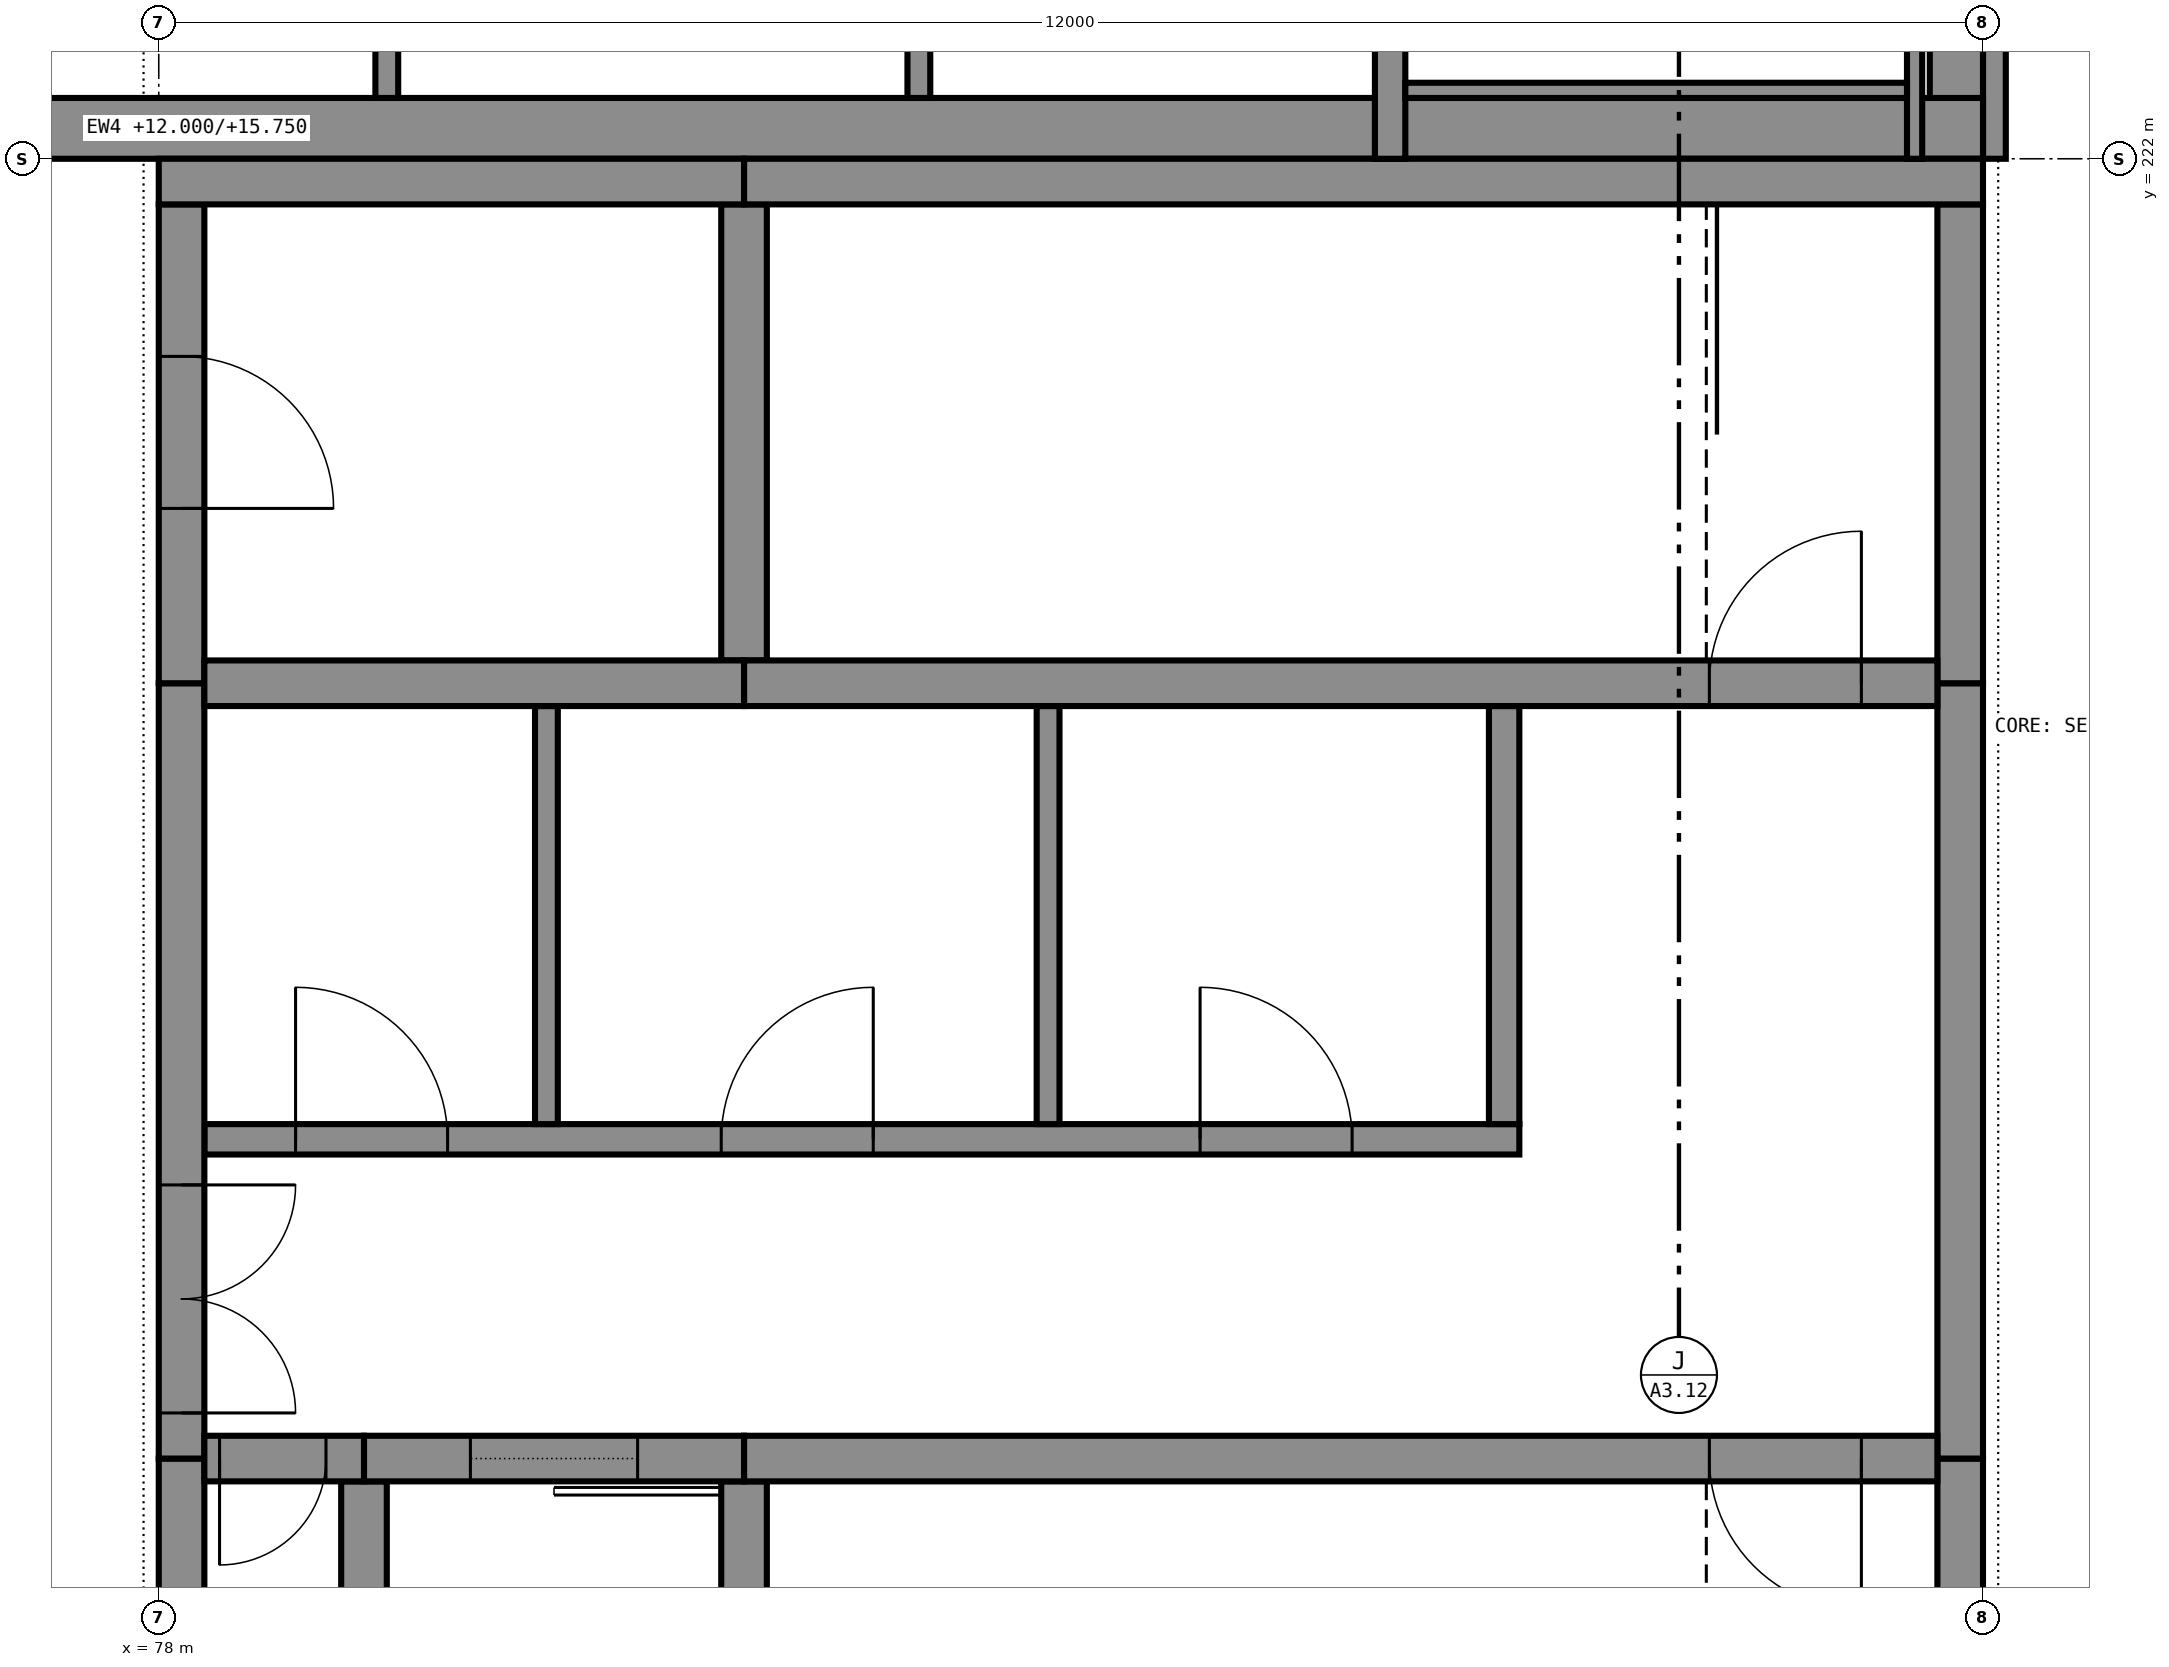
"""IFC4 building model, lengths in metres.
Left out: names, types, materials, properties, quantities, classifications, styles, units other than length and angle.
Written with IfcOpenShell. Run it as: python <this file> out.ifc"""

import sys

from ifc_helpers import new_model, si_unit, direction, frame, frame_2d, origin, place, context, subcontext, project, spatial, rectangle, extrude, element, fill, save


model = new_model("IFC4")
c1 = context("Model", 3, precision=1e-05, world=origin(), true_north=direction((0.0, 1.0)))
c2 = subcontext(c1, "Body", "Model", "MODEL_VIEW")
j1 = project(units=[si_unit("LENGTHUNIT", "METRE"), si_unit("PLANEANGLEUNIT", "RADIAN")], contexts=[c1])
p1 = place(None, origin())
s1 = spatial("IfcSite", under=j1, at=p1, CompositionType="ELEMENT")
p2 = place(p1, origin())
s2 = spatial("IfcBuilding", under=s1, at=p2, CompositionType="ELEMENT")
p3 = place(p2, frame((0.0, 0.0, 12.0)))
s3 = spatial("IfcBuildingStorey", under=s2, at=p3, CompositionType="ELEMENT", Elevation=12.0)
p4 = place(p3, frame((90.0, 221.85, 0.0), z_axis=(0.0, 0.0, 1.0), x_axis=(-1.0, 0.0, 0.0)))
e1 = element("IfcWall", 1, at=p4, inside=s3, PredefinedType="SHEAR", context=c2, shape_type="SweptSolid", body=[
    extrude(rectangle(XDim=8.15, YDim=0.3, at=frame_2d((4.075, 0.0))), origin(), (0.0, 0.0, 1.0), 5.0),
])
p5 = place(p3, frame((81.85, 221.85, 0.0), z_axis=(0.0, 0.0, 1.0), x_axis=(-1.0, 0.0, 0.0)))
e2 = element("IfcWall", 2, at=p5, inside=s3, PredefinedType="SHEAR", context=c2, shape_type="SweptSolid", body=[
    extrude(rectangle(XDim=3.85, YDim=0.3, at=frame_2d((1.925, 0.0))), origin(), (0.0, 0.0, 1.0), 5.0),
])
p6 = place(p3, frame((89.7, 213.45, 0.0), z_axis=(0.0, 0.0, 1.0), x_axis=(-1.0, 0.0, 0.0)))
e3 = element("IfcWall", 3, at=p6, inside=s3, PredefinedType="SHEAR", context=c2, shape_type="SweptSolid", body=[
    extrude(rectangle(XDim=7.85, YDim=0.3, at=frame_2d((3.925, 0.0))), origin(), (0.0, 0.0, 1.0), 5.0),
])
p7 = place(p6, frame((0.5, 0.0, 0.0)))
e4 = element("IfcOpeningElement", 4, at=p7, cuts=e3, PredefinedType="OPENING", context=c2, shape_type="SweptSolid", body=[
    extrude(rectangle(XDim=1.0, YDim=2.1, at=frame_2d((0.5, 1.05))), frame((0.0, 0.16, 0.0), z_axis=(0.0, -1.0, 0.0), x_axis=(1.0, 0.0, 0.0)), (0.0, 0.0, 1.0), 0.32),
])
p8 = place(p3, frame((81.85, 213.45, 0.0), z_axis=(0.0, 0.0, 1.0), x_axis=(-1.0, 0.0, 0.0)))
e5 = element("IfcWall", 5, at=p8, inside=s3, PredefinedType="SHEAR", context=c2, shape_type="SweptSolid", body=[
    extrude(rectangle(XDim=2.5, YDim=0.3, at=frame_2d((1.25, 0.0))), origin(), (0.0, 0.0, 1.0), 5.0),
])
p9 = place(p8, frame((0.7, 0.0, 0.0)))
e6 = element("IfcOpeningElement", 6, at=p9, cuts=e5, PredefinedType="OPENING", context=c2, shape_type="SweptSolid", body=[
    extrude(rectangle(XDim=1.1, YDim=2.1, at=frame_2d((0.55, 1.05))), frame((0.0, 0.16, 0.0), z_axis=(0.0, -1.0, 0.0), x_axis=(1.0, 0.0, 0.0)), (0.0, 0.0, 1.0), 0.32),
])
p10 = place(p3, frame((79.35, 213.45, 0.0), z_axis=(0.0, 0.0, 1.0), x_axis=(-1.0, 0.0, 0.0)))
e7 = element("IfcWall", 7, at=p10, inside=s3, PredefinedType="SHEAR", context=c2, shape_type="SweptSolid", body=[
    extrude(rectangle(XDim=1.05, YDim=0.3, at=frame_2d((0.525, 0.0))), origin(), (0.0, 0.0, 1.0), 5.0),
])
p11 = place(p10, frame((0.25, 0.0, 0.0)))
e8 = element("IfcOpeningElement", 8, at=p11, cuts=e7, PredefinedType="OPENING", context=c2, shape_type="SweptSolid", body=[
    extrude(rectangle(XDim=0.7, YDim=2.1, at=frame_2d((0.35, 1.05))), frame((0.0, 0.16, 0.0), z_axis=(0.0, -1.0, 0.0), x_axis=(1.0, 0.0, 0.0)), (0.0, 0.0, 1.0), 0.32),
])
p12 = place(p3, frame((89.7, 218.55, 0.0), z_axis=(0.0, 0.0, 1.0), x_axis=(-1.0, 0.0, 0.0)))
e9 = element("IfcWall", 9, at=p12, inside=s3, PredefinedType="SHEAR", context=c2, shape_type="SweptSolid", body=[
    extrude(rectangle(XDim=7.85, YDim=0.3, at=frame_2d((3.925, 0.0))), origin(), (0.0, 0.0, 1.0), 5.0),
])
p13 = place(p12, frame((0.5, 0.0, 0.0)))
e10 = element("IfcOpeningElement", 10, at=p13, cuts=e9, PredefinedType="OPENING", context=c2, shape_type="SweptSolid", body=[
    extrude(rectangle(XDim=1.0, YDim=2.1, at=frame_2d((0.5, 1.05))), frame((0.0, 0.16, 0.0), z_axis=(0.0, -1.0, 0.0), x_axis=(1.0, 0.0, 0.0)), (0.0, 0.0, 1.0), 0.32),
])
p14 = place(p3, frame((81.85, 218.55, 0.0), z_axis=(0.0, 0.0, 1.0), x_axis=(-1.0, 0.0, 0.0)))
e11 = element("IfcWall", 11, at=p14, inside=s3, PredefinedType="SHEAR", context=c2, shape_type="SweptSolid", body=[
    extrude(rectangle(XDim=3.55, YDim=0.3, at=frame_2d((1.775, 0.0))), origin(), (0.0, 0.0, 1.0), 5.0),
])
p15 = place(p3, frame((89.85, 210.0, 0.0), z_axis=(0.0, 0.0, 1.0), x_axis=(0.0, 1.0, 0.0)))
e12 = element("IfcWall", 12, at=p15, inside=s3, PredefinedType="SHEAR", context=c2, shape_type="SweptSolid", body=[
    extrude(rectangle(XDim=3.45, YDim=0.3, at=frame_2d((1.725, 0.0))), origin(), (0.0, 0.0, 1.0), 5.0),
])
p16 = place(p3, frame((89.85, 213.45, 0.0), z_axis=(0.0, 0.0, 1.0), x_axis=(0.0, 1.0, 0.0)))
e13 = element("IfcWall", 13, at=p16, inside=s3, PredefinedType="SHEAR", context=c2, shape_type="SweptSolid", body=[
    extrude(rectangle(XDim=5.1, YDim=0.3, at=frame_2d((2.55, 0.0))), origin(), (0.0, 0.0, 1.0), 5.0),
])
for number, where, z_axis, x_axis in (
    (14, (89.85, 218.55, 0.0), (0.0, 0.0, 1.0), (0.0, 1.0, 0.0)),
    (15, (78.15, 210.3, 0.0), (0.0, 0.0, 1.0), (0.0, 1.0, 0.0)),
):
    element("IfcWall", number, at=place(p3, frame(where, z_axis=z_axis, x_axis=x_axis)), inside=s3, PredefinedType="SHEAR", context=c2, shape_type="SweptSolid", body=[
        extrude(rectangle(XDim=3.15, YDim=0.3, at=frame_2d((1.575, 0.0))), origin(), (0.0, 0.0, 1.0), 5.0),
    ])
p17 = place(p3, frame((78.15, 213.45, 0.0), z_axis=(0.0, 0.0, 1.0), x_axis=(0.0, 1.0, 0.0)))
e16 = element("IfcWall", 16, at=p17, inside=s3, PredefinedType="SHEAR", context=c2, shape_type="SweptSolid", body=[
    extrude(rectangle(XDim=5.1, YDim=0.3, at=frame_2d((2.55, 0.0))), origin(), (0.0, 0.0, 1.0), 5.0),
])
p18 = place(p17, frame((0.3, 0.0, 0.0)))
e17 = element("IfcOpeningElement", 17, at=p18, cuts=e16, PredefinedType="OPENING", context=c2, shape_type="SweptSolid", body=[
    extrude(rectangle(XDim=1.5, YDim=2.1, at=frame_2d((0.75, 1.05))), frame((0.0, 0.16, 0.0), z_axis=(0.0, -1.0, 0.0), x_axis=(1.0, 0.0, 0.0)), (0.0, 0.0, 1.0), 0.32),
])
p19 = place(p3, frame((78.15, 218.55, 0.0), z_axis=(0.0, 0.0, 1.0), x_axis=(0.0, 1.0, 0.0)))
e18 = element("IfcWall", 18, at=p19, inside=s3, PredefinedType="SHEAR", context=c2, shape_type="SweptSolid", body=[
    extrude(rectangle(XDim=3.15, YDim=0.3, at=frame_2d((1.575, 0.0))), origin(), (0.0, 0.0, 1.0), 5.0),
])
p20 = place(p19, frame((1.15, 0.0, 0.0)))
e19 = element("IfcOpeningElement", 19, at=p20, cuts=e18, PredefinedType="OPENING", context=c2, shape_type="SweptSolid", body=[
    extrude(rectangle(XDim=1.0, YDim=2.1, at=frame_2d((0.5, 1.05))), frame((0.0, 0.16, 0.0), z_axis=(0.0, -1.0, 0.0), x_axis=(1.0, 0.0, 0.0)), (0.0, 0.0, 1.0), 0.32),
])
p21 = place(p3, frame((81.85, 210.0, 0.0), z_axis=(0.0, 0.0, 1.0), x_axis=(0.0, 1.0, 0.0)))
e20 = element("IfcWall", 20, at=p21, inside=s3, PredefinedType="SHEAR", context=c2, shape_type="SweptSolid", body=[
    extrude(rectangle(XDim=3.3, YDim=0.3, at=frame_2d((1.65, 0.0))), origin(), (0.0, 0.0, 1.0), 5.0),
])
for number, where, z_axis, x_axis in (
    (21, (81.85, 218.7, 0.0), (0.0, 0.0, 1.0), (0.0, 1.0, 0.0)),
    (22, (79.35, 210.3, 0.0), (0.0, 0.0, 1.0), (0.0, 1.0, 0.0)),
):
    element("IfcWall", number, at=place(p3, frame(where, z_axis=z_axis, x_axis=x_axis)), inside=s3, PredefinedType="SHEAR", context=c2, shape_type="SweptSolid", body=[
        extrude(rectangle(XDim=3.0, YDim=0.3, at=frame_2d((1.5, 0.0))), origin(), (0.0, 0.0, 1.0), 5.0),
    ])
p22 = place(p3, frame((86.1, 222.0, 0.0), z_axis=(0.0, 0.0, 1.0), x_axis=(0.0, 1.0, 0.0)))
e23 = element("IfcWall", 23, at=p22, inside=s3, PredefinedType="SHEAR", context=c2, shape_type="SweptSolid", body=[
    extrude(rectangle(XDim=7.5, YDim=0.2, at=frame_2d((3.75, 0.0))), origin(), (0.0, 0.0, 1.0), 5.0),
])
p23 = place(p3, frame((89.55, 229.7, 0.0), z_axis=(0.0, 0.0, 1.0), x_axis=(0.0, -1.0, 0.0)))
e24 = element("IfcWall", 24, at=p23, inside=s3, PredefinedType="SHEAR", context=c2, shape_type="SweptSolid", body=[
    extrude(rectangle(XDim=7.7, YDim=0.1, at=frame_2d((3.85, 0.0))), origin(), (0.0, 0.0, 1.0), 4.75),
])
p24 = place(p3, frame((89.5, 222.45, 0.0), z_axis=(0.0, 0.0, 1.0), x_axis=(-1.0, 0.0, 0.0)))
e25 = element("IfcWall", 25, at=p24, inside=s3, PredefinedType="SHEAR", context=c2, shape_type="SweptSolid", body=[
    extrude(rectangle(XDim=3.3, YDim=0.1, at=frame_2d((1.65, 0.0))), origin(), (0.0, 0.0, 1.0), 4.75),
])
p25 = place(p3, frame((66.5, 222.2, 0.0), z_axis=(0.0, 0.0, 1.0), x_axis=(1.0, 0.0, 0.0)))
e26 = element("IfcWall", 26, at=p25, inside=s3, PredefinedType="SOLIDWALL", context=c2, shape_type="SweptSolid", body=[
    extrude(rectangle(XDim=23.5, YDim=0.4, at=frame_2d((11.75, 0.0))), origin(), (0.0, 0.0, 1.0), 3.75),
])
p26 = place(p3, frame((89.825, 222.0, 0.0), z_axis=(0.0, 0.0, 1.0), x_axis=(0.0, 1.0, 0.0)))
e27 = element("IfcWall", 27, at=p26, inside=s3, PredefinedType="STANDARD", context=c2, shape_type="SweptSolid", body=[
    extrude(rectangle(XDim=11.5, YDim=0.35, at=frame_2d((5.75, 0.0))), origin(), (0.0, 0.0, 1.0), 3.75),
])
p27 = place(p26, frame((1.55, 0.0, 0.6)))
e28 = element("IfcOpeningElement", 28, at=p27, cuts=e27, PredefinedType="OPENING", context=c2, shape_type="SweptSolid", body=[
    extrude(rectangle(XDim=2.4, YDim=2.4, at=frame_2d((1.2, 1.2))), frame((0.0, 0.185, 0.0), z_axis=(0.0, -1.0, 0.0), x_axis=(1.0, 0.0, 0.0)), (0.0, 0.0, 1.0), 0.37),
])
p28 = place(p26, frame((7.8, 0.0, 0.6)))
e29 = element("IfcOpeningElement", 29, at=p28, cuts=e27, PredefinedType="OPENING", context=c2, shape_type="SweptSolid", body=[
    extrude(rectangle(XDim=2.4, YDim=2.4, at=frame_2d((1.2, 1.2))), frame((0.0, 0.185, 0.0), z_axis=(0.0, -1.0, 0.0), x_axis=(1.0, 0.0, 0.0)), (0.0, 0.0, 1.0), 0.37),
])
p29 = place(p3, frame((90.075, 222.0, 4.75), z_axis=(0.0, 0.0, 1.0), x_axis=(0.0, 1.0, 0.0)))
e30 = element("IfcWall", 30, at=p29, inside=s3, PredefinedType="STANDARD", context=c2, shape_type="SweptSolid", body=[
    extrude(rectangle(XDim=11.5, YDim=0.15, at=frame_2d((5.75, 0.0))), origin(), (0.0, 0.0, 1.0), 0.25),
])
p30 = place(p3, frame((78.3, 215.55, 0.0), z_axis=(0.0, 0.0, 1.0), x_axis=(1.0, 0.0, 0.0)))
e31 = element("IfcWall", 31, at=p30, inside=s3, PredefinedType="PARTITIONING", context=c2, shape_type="SweptSolid", body=[
    extrude(rectangle(XDim=8.65, YDim=0.2, at=frame_2d((4.325, 0.0))), origin(), (0.0, 0.0, 1.0), 4.825),
])
p31 = place(p30, frame((0.6, 0.0, 0.0)))
e32 = element("IfcOpeningElement", 32, at=p31, cuts=e31, PredefinedType="OPENING", context=c2, shape_type="SweptSolid", body=[
    extrude(rectangle(XDim=1.0, YDim=2.1, at=frame_2d((0.5, 1.05))), frame((0.0, 0.11, 0.0), z_axis=(0.0, -1.0, 0.0), x_axis=(1.0, 0.0, 0.0)), (0.0, 0.0, 1.0), 0.22),
])
p32 = place(p30, frame((3.4, 0.0, 0.0)))
e33 = element("IfcOpeningElement", 33, at=p32, cuts=e31, PredefinedType="OPENING", context=c2, shape_type="SweptSolid", body=[
    extrude(rectangle(XDim=1.0, YDim=2.1, at=frame_2d((0.5, 1.05))), frame((0.0, 0.11, 0.0), z_axis=(0.0, -1.0, 0.0), x_axis=(1.0, 0.0, 0.0)), (0.0, 0.0, 1.0), 0.22),
])
p33 = place(p30, frame((6.55, 0.0, 0.0)))
e34 = element("IfcOpeningElement", 34, at=p33, cuts=e31, PredefinedType="OPENING", context=c2, shape_type="SweptSolid", body=[
    extrude(rectangle(XDim=1.0, YDim=2.1, at=frame_2d((0.5, 1.05))), frame((0.0, 0.11, 0.0), z_axis=(0.0, -1.0, 0.0), x_axis=(1.0, 0.0, 0.0)), (0.0, 0.0, 1.0), 0.22),
])
for number, where, z_axis, x_axis in (
    (35, (80.55, 215.65, 0.0), (0.0, 0.0, 1.0), (0.0, 1.0, 0.0)),
    (36, (83.85, 215.65, 0.0), (0.0, 0.0, 1.0), (0.0, 1.0, 0.0)),
):
    element("IfcWall", number, at=place(p3, frame(where, z_axis=z_axis, x_axis=x_axis)), inside=s3, PredefinedType="PARTITIONING", context=c2, shape_type="SweptSolid", body=[
        extrude(rectangle(XDim=2.75, YDim=0.15, at=frame_2d((1.375, 0.0))), origin(), (0.0, 0.0, 1.0), 4.825),
    ])
p34 = place(p3, frame((86.85, 215.65, 0.0), z_axis=(0.0, 0.0, 1.0), x_axis=(0.0, 1.0, 0.0)))
e37 = element("IfcWall", 37, at=p34, inside=s3, PredefinedType="PARTITIONING", context=c2, shape_type="SweptSolid", body=[
    extrude(rectangle(XDim=2.75, YDim=0.2, at=frame_2d((1.375, 0.0))), origin(), (0.0, 0.0, 1.0), 4.825),
])
for number, where, z_axis, x_axis in (
    (38, (79.5, 222.4, 0.0), (0.0, 0.0, 1.0), (0.0, 1.0, 0.0)),
    (39, (83.0, 222.4, 0.0), (0.0, 0.0, 1.0), (0.0, 1.0, 0.0)),
):
    element("IfcWall", number, at=place(p3, frame(where, z_axis=z_axis, x_axis=x_axis)), inside=s3, PredefinedType="PARTITIONING", context=c2, shape_type="SweptSolid", body=[
        extrude(rectangle(XDim=7.225, YDim=0.15, at=frame_2d((3.613, 0.0))), origin(), (0.0, 0.0, 1.0), 4.75),
    ])
p35 = place(p11, origin())
e40 = element("IfcDoor", 40, at=p35, inside=s3, OperationType="SINGLE_SWING_LEFT", PredefinedType="DOOR", context=c2, shape_type="SweptSolid", body=[
    extrude(rectangle(XDim=0.7, YDim=2.1, at=frame_2d((0.35, 1.05))), frame((0.0, 0.025, 0.0), z_axis=(0.0, -1.0, 0.0), x_axis=(1.0, 0.0, 0.0)), (0.0, 0.0, 1.0), 0.05),
])
fill(e8, e40)
p36 = place(p9, origin())
e41 = element("IfcDoor", 41, at=p36, inside=s3, OperationType="SLIDING_TO_LEFT", PredefinedType="DOOR", context=c2, shape_type="SweptSolid", body=[
    extrude(rectangle(XDim=1.1, YDim=2.1, at=frame_2d((0.55, 1.05))), frame((0.0, 0.025, 0.0), z_axis=(0.0, -1.0, 0.0), x_axis=(1.0, 0.0, 0.0)), (0.0, 0.0, 1.0), 0.05),
])
fill(e6, e41)
p37 = place(p7, origin())
e42 = element("IfcDoor", 42, at=p37, inside=s3, OperationType="SINGLE_SWING_RIGHT", PredefinedType="DOOR", context=c2, shape_type="SweptSolid", body=[
    extrude(rectangle(XDim=1.0, YDim=2.1, at=frame_2d((0.5, 1.05))), frame((0.0, 0.025, 0.0), z_axis=(0.0, -1.0, 0.0), x_axis=(1.0, 0.0, 0.0)), (0.0, 0.0, 1.0), 0.05),
])
fill(e4, e42)
p38 = place(p18, frame((1.5, 0.0, 0.0), z_axis=(0.0, 0.0, 1.0), x_axis=(-1.0, 0.0, 0.0)))
e43 = element("IfcDoor", 43, at=p38, inside=s3, OperationType="DOUBLE_DOOR_SINGLE_SWING", PredefinedType="DOOR", context=c2, shape_type="SweptSolid", body=[
    extrude(rectangle(XDim=1.5, YDim=2.1, at=frame_2d((0.75, 1.05))), frame((0.0, 0.025, 0.0), z_axis=(0.0, -1.0, 0.0), x_axis=(1.0, 0.0, 0.0)), (0.0, 0.0, 1.0), 0.05),
])
fill(e17, e43)
p39 = place(p31, origin())
e44 = element("IfcDoor", 44, at=p39, inside=s3, OperationType="SINGLE_SWING_RIGHT", PredefinedType="DOOR", context=c2, shape_type="SweptSolid", body=[
    extrude(rectangle(XDim=1.0, YDim=2.1, at=frame_2d((0.5, 1.05))), frame((0.0, 0.025, 0.0), z_axis=(0.0, -1.0, 0.0), x_axis=(1.0, 0.0, 0.0)), (0.0, 0.0, 1.0), 0.05),
])
fill(e32, e44)
p40 = place(p32, origin())
e45 = element("IfcDoor", 45, at=p40, inside=s3, OperationType="SINGLE_SWING_LEFT", PredefinedType="DOOR", context=c2, shape_type="SweptSolid", body=[
    extrude(rectangle(XDim=1.0, YDim=2.1, at=frame_2d((0.5, 1.05))), frame((0.0, 0.025, 0.0), z_axis=(0.0, -1.0, 0.0), x_axis=(1.0, 0.0, 0.0)), (0.0, 0.0, 1.0), 0.05),
])
fill(e33, e45)
p41 = place(p33, origin())
e46 = element("IfcDoor", 46, at=p41, inside=s3, OperationType="SINGLE_SWING_RIGHT", PredefinedType="DOOR", context=c2, shape_type="SweptSolid", body=[
    extrude(rectangle(XDim=1.0, YDim=2.1, at=frame_2d((0.5, 1.05))), frame((0.0, 0.025, 0.0), z_axis=(0.0, -1.0, 0.0), x_axis=(1.0, 0.0, 0.0)), (0.0, 0.0, 1.0), 0.05),
])
fill(e34, e46)
p42 = place(p13, frame((1.0, 0.0, 0.0), z_axis=(0.0, 0.0, 1.0), x_axis=(-1.0, 0.0, 0.0)))
e47 = element("IfcDoor", 47, at=p42, inside=s3, OperationType="SINGLE_SWING_LEFT", PredefinedType="DOOR", context=c2, shape_type="SweptSolid", body=[
    extrude(rectangle(XDim=1.0, YDim=2.1, at=frame_2d((0.5, 1.05))), frame((0.0, 0.025, 0.0), z_axis=(0.0, -1.0, 0.0), x_axis=(1.0, 0.0, 0.0)), (0.0, 0.0, 1.0), 0.05),
])
fill(e10, e47)
p43 = place(p20, frame((1.0, 0.0, 0.0), z_axis=(0.0, 0.0, 1.0), x_axis=(-1.0, 0.0, 0.0)))
e48 = element("IfcDoor", 48, at=p43, inside=s3, OperationType="SINGLE_SWING_LEFT", PredefinedType="DOOR", context=c2, shape_type="SweptSolid", body=[
    extrude(rectangle(XDim=1.0, YDim=2.1, at=frame_2d((0.5, 1.05))), frame((0.0, 0.025, 0.0), z_axis=(0.0, -1.0, 0.0), x_axis=(1.0, 0.0, 0.0)), (0.0, 0.0, 1.0), 0.05),
])
fill(e19, e48)
save(model, sys.argv[1])
